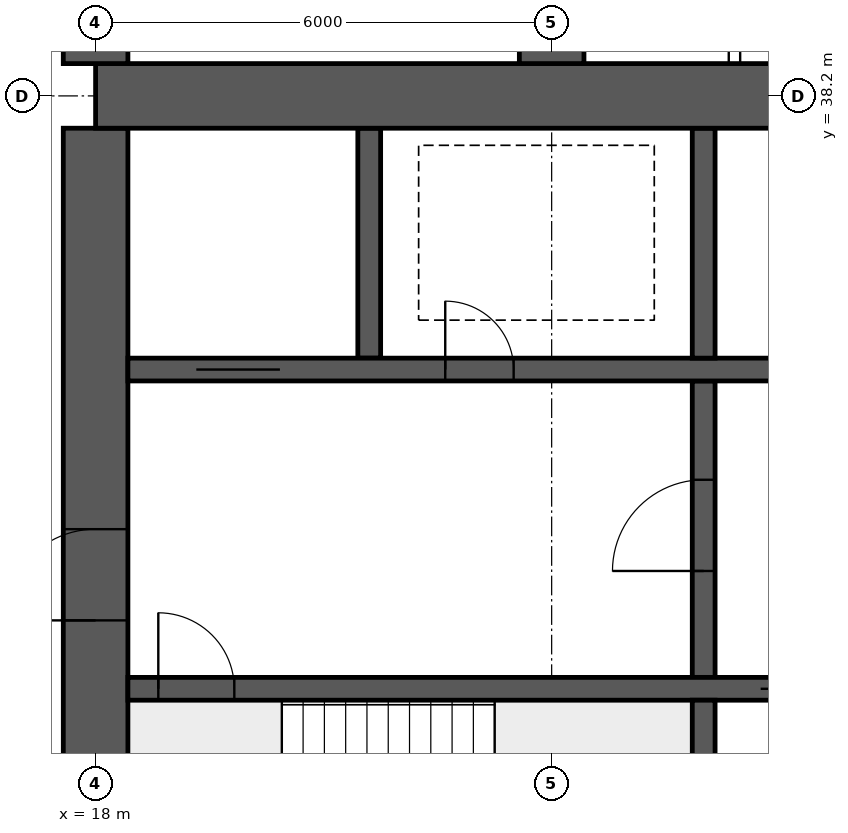
"""IFC4 building model, lengths in metres.
Left out: names, types, materials, properties, quantities, classifications, styles, units other than length and angle.
Written with IfcOpenShell. Run it as: python <this file> out.ifc"""

import sys

from ifc_helpers import new_model, si_unit, direction, frame, frame_2d, origin, place, context, subcontext, project, spatial, rectangle, extrude, element, fill, save


model = new_model("IFC4")
c1 = context("Model", 3, precision=1e-05, world=origin(), true_north=direction((0.0, 1.0)))
c2 = subcontext(c1, "Body", "Model", "MODEL_VIEW")
j1 = project(units=[si_unit("LENGTHUNIT", "METRE"), si_unit("PLANEANGLEUNIT", "RADIAN")], contexts=[c1])
p1 = place(None, origin())
s1 = spatial("IfcSite", under=j1, at=p1, CompositionType="ELEMENT")
p2 = place(p1, origin())
s2 = spatial("IfcBuilding", under=s1, at=p2, CompositionType="ELEMENT")
p3 = place(p2, frame((0.0, 0.0, 148.6)))
s3 = spatial("IfcBuildingStorey", under=s2, at=p3, CompositionType="ELEMENT", Elevation=148.6)
p4 = place(p3, frame((18.0, 38.2, 0.0), z_axis=(0.0, 0.0, 1.0), x_axis=(1.0, 0.0, 0.0)))
e1 = element("IfcWall", 1, at=p4, inside=s3, PredefinedType="SHEAR", context=c2, shape_type="SweptSolid", body=[
    extrude(rectangle(XDim=48.0, YDim=0.85, at=frame_2d((24.0, 0.0))), origin(), (0.0, 0.0, 1.0), 3.75),
])
p5 = place(p3, frame((18.0, 26.225, 0.0), z_axis=(0.0, 0.0, 1.0), x_axis=(0.0, 1.0, 0.0)))
e2 = element("IfcWall", 2, at=p5, inside=s3, PredefinedType="SHEAR", context=c2, shape_type="SweptSolid", body=[
    extrude(rectangle(XDim=11.55, YDim=0.85, at=frame_2d((5.775, 0.0))), origin(), (0.0, 0.0, 1.0), 3.75),
])
p6 = place(p5, frame((5.075, 0.0, 0.0)))
e3 = element("IfcOpeningElement", 3, at=p6, cuts=e2, PredefinedType="OPENING", context=c2, shape_type="SweptSolid", body=[
    extrude(rectangle(XDim=1.2, YDim=2.1, at=frame_2d((0.6, 1.05))), frame((0.0, 0.435, 0.0), z_axis=(0.0, -1.0, 0.0), x_axis=(1.0, 0.0, 0.0)), (0.0, 0.0, 1.0), 0.87),
])
p7 = place(p3, frame((18.425, 30.4, 0.0), z_axis=(0.0, 0.0, 1.0), x_axis=(1.0, 0.0, 0.0)))
e4 = element("IfcWall", 4, at=p7, inside=s3, PredefinedType="SHEAR", context=c2, shape_type="SweptSolid", body=[
    extrude(rectangle(XDim=47.15, YDim=0.3, at=frame_2d((23.575, 0.0))), origin(), (0.0, 0.0, 1.0), 3.75),
])
p8 = place(p7, frame((0.4, 0.0, 0.0)))
e5 = element("IfcOpeningElement", 5, at=p8, cuts=e4, PredefinedType="OPENING", context=c2, shape_type="SweptSolid", body=[
    extrude(rectangle(XDim=1.0, YDim=2.1, at=frame_2d((0.5, 1.05))), frame((0.0, 0.16, 0.0), z_axis=(0.0, -1.0, 0.0), x_axis=(1.0, 0.0, 0.0)), (0.0, 0.0, 1.0), 0.32),
])
p9 = place(p7, frame((45.75, 0.0, 0.0)))
e6 = element("IfcOpeningElement", 6, at=p9, cuts=e4, PredefinedType="OPENING", context=c2, shape_type="SweptSolid", body=[
    extrude(rectangle(XDim=1.0, YDim=2.1, at=frame_2d((0.5, 1.05))), frame((0.0, 0.16, 0.0), z_axis=(0.0, -1.0, 0.0), x_axis=(1.0, 0.0, 0.0)), (0.0, 0.0, 1.0), 0.32),
])
p10 = place(p7, frame((8.325, 0.0, 0.0)))
e7 = element("IfcOpeningElement", 7, at=p10, cuts=e4, PredefinedType="OPENING", context=c2, shape_type="SweptSolid", body=[
    extrude(rectangle(XDim=1.1, YDim=2.1, at=frame_2d((0.55, 1.05))), frame((0.0, 0.16, 0.0), z_axis=(0.0, -1.0, 0.0), x_axis=(1.0, 0.0, 0.0)), (0.0, 0.0, 1.0), 0.32),
])
p11 = place(p7, frame((10.925, 0.0, 0.0)))
e8 = element("IfcOpeningElement", 8, at=p11, cuts=e4, PredefinedType="OPENING", context=c2, shape_type="SweptSolid", body=[
    extrude(rectangle(XDim=1.1, YDim=2.1, at=frame_2d((0.55, 1.05))), frame((0.0, 0.16, 0.0), z_axis=(0.0, -1.0, 0.0), x_axis=(1.0, 0.0, 0.0)), (0.0, 0.0, 1.0), 0.32),
])
p12 = place(p7, frame((13.525, 0.0, 0.0)))
e9 = element("IfcOpeningElement", 9, at=p12, cuts=e4, PredefinedType="OPENING", context=c2, shape_type="SweptSolid", body=[
    extrude(rectangle(XDim=1.1, YDim=2.1, at=frame_2d((0.55, 1.05))), frame((0.0, 0.16, 0.0), z_axis=(0.0, -1.0, 0.0), x_axis=(1.0, 0.0, 0.0)), (0.0, 0.0, 1.0), 0.32),
])
p13 = place(p7, frame((16.125, 0.0, 0.0)))
e10 = element("IfcOpeningElement", 10, at=p13, cuts=e4, PredefinedType="OPENING", context=c2, shape_type="SweptSolid", body=[
    extrude(rectangle(XDim=1.1, YDim=2.1, at=frame_2d((0.55, 1.05))), frame((0.0, 0.16, 0.0), z_axis=(0.0, -1.0, 0.0), x_axis=(1.0, 0.0, 0.0)), (0.0, 0.0, 1.0), 0.32),
])
p14 = place(p7, frame((18.9, 0.0, 0.0)))
e11 = element("IfcOpeningElement", 11, at=p14, cuts=e4, PredefinedType="OPENING", context=c2, shape_type="SweptSolid", body=[
    extrude(rectangle(XDim=0.9, YDim=2.1, at=frame_2d((0.45, 1.05))), frame((0.0, 0.16, 0.0), z_axis=(0.0, -1.0, 0.0), x_axis=(1.0, 0.0, 0.0)), (0.0, 0.0, 1.0), 0.32),
])
p15 = place(p7, frame((30.192, 0.0, 0.0)))
e12 = element("IfcOpeningElement", 12, at=p15, cuts=e4, PredefinedType="OPENING", context=c2, shape_type="SweptSolid", body=[
    extrude(rectangle(XDim=1.1, YDim=2.1, at=frame_2d((0.55, 1.05))), frame((0.0, 0.16, 0.0), z_axis=(0.0, -1.0, 0.0), x_axis=(1.0, 0.0, 0.0)), (0.0, 0.0, 1.0), 0.32),
])
p16 = place(p7, frame((33.725, 0.0, 0.0)))
e13 = element("IfcOpeningElement", 13, at=p16, cuts=e4, PredefinedType="OPENING", context=c2, shape_type="SweptSolid", body=[
    extrude(rectangle(XDim=1.1, YDim=2.1, at=frame_2d((0.55, 1.05))), frame((0.0, 0.16, 0.0), z_axis=(0.0, -1.0, 0.0), x_axis=(1.0, 0.0, 0.0)), (0.0, 0.0, 1.0), 0.32),
])
p17 = place(p7, frame((37.258, 0.0, 0.0)))
e14 = element("IfcOpeningElement", 14, at=p17, cuts=e4, PredefinedType="OPENING", context=c2, shape_type="SweptSolid", body=[
    extrude(rectangle(XDim=1.1, YDim=2.1, at=frame_2d((0.55, 1.05))), frame((0.0, 0.16, 0.0), z_axis=(0.0, -1.0, 0.0), x_axis=(1.0, 0.0, 0.0)), (0.0, 0.0, 1.0), 0.32),
])
p18 = place(p3, frame((18.425, 34.6, 0.0), z_axis=(0.0, 0.0, 1.0), x_axis=(1.0, 0.0, 0.0)))
e15 = element("IfcWall", 15, at=p18, inside=s3, PredefinedType="SHEAR", context=c2, shape_type="SweptSolid", body=[
    extrude(rectangle(XDim=47.15, YDim=0.3, at=frame_2d((23.575, 0.0))), origin(), (0.0, 0.0, 1.0), 3.75),
])
p19 = place(p18, frame((0.9, 0.0, 0.0)))
e16 = element("IfcOpeningElement", 16, at=p19, cuts=e15, PredefinedType="OPENING", context=c2, shape_type="SweptSolid", body=[
    extrude(rectangle(XDim=1.1, YDim=2.1, at=frame_2d((0.55, 1.05))), frame((0.0, 0.16, 0.0), z_axis=(0.0, -1.0, 0.0), x_axis=(1.0, 0.0, 0.0)), (0.0, 0.0, 1.0), 0.32),
])
p20 = place(p18, frame((45.15, 0.0, 0.0)))
e17 = element("IfcOpeningElement", 17, at=p20, cuts=e15, PredefinedType="OPENING", context=c2, shape_type="SweptSolid", body=[
    extrude(rectangle(XDim=1.1, YDim=2.1, at=frame_2d((0.55, 1.05))), frame((0.0, 0.16, 0.0), z_axis=(0.0, -1.0, 0.0), x_axis=(1.0, 0.0, 0.0)), (0.0, 0.0, 1.0), 0.32),
])
p21 = place(p18, frame((4.175, 0.0, 0.0)))
e18 = element("IfcOpeningElement", 18, at=p21, cuts=e15, PredefinedType="OPENING", context=c2, shape_type="SweptSolid", body=[
    extrude(rectangle(XDim=0.9, YDim=2.1, at=frame_2d((0.45, 1.05))), frame((0.0, 0.16, 0.0), z_axis=(0.0, -1.0, 0.0), x_axis=(1.0, 0.0, 0.0)), (0.0, 0.0, 1.0), 0.32),
])
p22 = place(p18, frame((42.075, 0.0, 0.0)))
e19 = element("IfcOpeningElement", 19, at=p22, cuts=e15, PredefinedType="OPENING", context=c2, shape_type="SweptSolid", body=[
    extrude(rectangle(XDim=0.9, YDim=2.1, at=frame_2d((0.45, 1.05))), frame((0.0, 0.16, 0.0), z_axis=(0.0, -1.0, 0.0), x_axis=(1.0, 0.0, 0.0)), (0.0, 0.0, 1.0), 0.32),
])
p23 = place(p18, frame((8.95, 0.0, 0.0)))
e20 = element("IfcOpeningElement", 20, at=p23, cuts=e15, PredefinedType="OPENING", context=c2, shape_type="SweptSolid", body=[
    extrude(rectangle(XDim=0.9, YDim=2.1, at=frame_2d((0.45, 1.05))), frame((0.0, 0.16, 0.0), z_axis=(0.0, -1.0, 0.0), x_axis=(1.0, 0.0, 0.0)), (0.0, 0.0, 1.0), 0.32),
])
p24 = place(p18, frame((12.924, 0.0, 0.0)))
e21 = element("IfcOpeningElement", 21, at=p24, cuts=e15, PredefinedType="OPENING", context=c2, shape_type="SweptSolid", body=[
    extrude(rectangle(XDim=0.9, YDim=2.1, at=frame_2d((0.45, 1.05))), frame((0.0, 0.16, 0.0), z_axis=(0.0, -1.0, 0.0), x_axis=(1.0, 0.0, 0.0)), (0.0, 0.0, 1.0), 0.32),
])
p25 = place(p18, frame((16.571, 0.0, 0.0)))
e22 = element("IfcOpeningElement", 22, at=p25, cuts=e15, PredefinedType="OPENING", context=c2, shape_type="SweptSolid", body=[
    extrude(rectangle(XDim=0.9, YDim=2.1, at=frame_2d((0.45, 1.05))), frame((0.0, 0.16, 0.0), z_axis=(0.0, -1.0, 0.0), x_axis=(1.0, 0.0, 0.0)), (0.0, 0.0, 1.0), 0.32),
])
p26 = place(p18, frame((20.33, 0.0, 0.0)))
e23 = element("IfcOpeningElement", 23, at=p26, cuts=e15, PredefinedType="OPENING", context=c2, shape_type="SweptSolid", body=[
    extrude(rectangle(XDim=0.9, YDim=2.1, at=frame_2d((0.45, 1.05))), frame((0.0, 0.16, 0.0), z_axis=(0.0, -1.0, 0.0), x_axis=(1.0, 0.0, 0.0)), (0.0, 0.0, 1.0), 0.32),
])
p27 = place(p18, frame((24.736, 0.0, 0.0)))
e24 = element("IfcOpeningElement", 24, at=p27, cuts=e15, PredefinedType="OPENING", context=c2, shape_type="SweptSolid", body=[
    extrude(rectangle(XDim=0.9, YDim=2.1, at=frame_2d((0.45, 1.05))), frame((0.0, 0.16, 0.0), z_axis=(0.0, -1.0, 0.0), x_axis=(1.0, 0.0, 0.0)), (0.0, 0.0, 1.0), 0.32),
])
p28 = place(p18, frame((27.533, 0.0, 0.0)))
e25 = element("IfcOpeningElement", 25, at=p28, cuts=e15, PredefinedType="OPENING", context=c2, shape_type="SweptSolid", body=[
    extrude(rectangle(XDim=0.9, YDim=2.1, at=frame_2d((0.45, 1.05))), frame((0.0, 0.16, 0.0), z_axis=(0.0, -1.0, 0.0), x_axis=(1.0, 0.0, 0.0)), (0.0, 0.0, 1.0), 0.32),
])
p29 = place(p18, frame((29.703, 0.0, 0.0)))
e26 = element("IfcOpeningElement", 26, at=p29, cuts=e15, PredefinedType="OPENING", context=c2, shape_type="SweptSolid", body=[
    extrude(rectangle(XDim=0.9, YDim=2.1, at=frame_2d((0.45, 1.05))), frame((0.0, 0.16, 0.0), z_axis=(0.0, -1.0, 0.0), x_axis=(1.0, 0.0, 0.0)), (0.0, 0.0, 1.0), 0.32),
])
p30 = place(p18, frame((33.502, 0.0, 0.0)))
e27 = element("IfcOpeningElement", 27, at=p30, cuts=e15, PredefinedType="OPENING", context=c2, shape_type="SweptSolid", body=[
    extrude(rectangle(XDim=0.9, YDim=2.1, at=frame_2d((0.45, 1.05))), frame((0.0, 0.16, 0.0), z_axis=(0.0, -1.0, 0.0), x_axis=(1.0, 0.0, 0.0)), (0.0, 0.0, 1.0), 0.32),
])
p31 = place(p18, frame((37.453, 0.0, 0.0)))
e28 = element("IfcOpeningElement", 28, at=p31, cuts=e15, PredefinedType="OPENING", context=c2, shape_type="SweptSolid", body=[
    extrude(rectangle(XDim=0.9, YDim=2.1, at=frame_2d((0.45, 1.05))), frame((0.0, 0.16, 0.0), z_axis=(0.0, -1.0, 0.0), x_axis=(1.0, 0.0, 0.0)), (0.0, 0.0, 1.0), 0.32),
])
p32 = place(p3, frame((26.0, 26.225, 0.0), z_axis=(0.0, 0.0, 1.0), x_axis=(0.0, 1.0, 0.0)))
e29 = element("IfcWall", 29, at=p32, inside=s3, PredefinedType="SHEAR", context=c2, shape_type="SweptSolid", body=[
    extrude(rectangle(XDim=4.025, YDim=0.3, at=frame_2d((2.012, 0.0))), origin(), (0.0, 0.0, 1.0), 3.75),
])
p33 = place(p3, frame((26.0, 30.55, 0.0), z_axis=(0.0, 0.0, 1.0), x_axis=(0.0, 1.0, 0.0)))
e30 = element("IfcWall", 30, at=p33, inside=s3, PredefinedType="SHEAR", context=c2, shape_type="SweptSolid", body=[
    extrude(rectangle(XDim=3.9, YDim=0.3, at=frame_2d((1.95, 0.0))), origin(), (0.0, 0.0, 1.0), 3.75),
])
p34 = place(p33, frame((1.4, 0.0, 0.0)))
e31 = element("IfcOpeningElement", 31, at=p34, cuts=e30, PredefinedType="OPENING", context=c2, shape_type="SweptSolid", body=[
    extrude(rectangle(XDim=1.2, YDim=2.1, at=frame_2d((0.6, 1.05))), frame((0.0, 0.16, 0.0), z_axis=(0.0, -1.0, 0.0), x_axis=(1.0, 0.0, 0.0)), (0.0, 0.0, 1.0), 0.32),
])
for number, where, z_axis, x_axis in (
    (32, (21.6, 34.75, 0.0), (0.0, 0.0, 1.0), (0.0, 1.0, 0.0)),
    (33, (26.0, 34.75, 0.0), (0.0, 0.0, 1.0), (0.0, 1.0, 0.0)),
):
    element("IfcWall", number, at=place(p3, frame(where, z_axis=z_axis, x_axis=x_axis)), inside=s3, PredefinedType="SHEAR", context=c2, shape_type="SweptSolid", body=[
        extrude(rectangle(XDim=3.025, YDim=0.3, at=frame_2d((1.512, 0.0))), origin(), (0.0, 0.0, 1.0), 3.75),
    ])
for number, where, z_axis, x_axis in (
    (34, (18.0, 38.625, 0.0), (0.0, 0.0, 1.0), (0.0, 1.0, 0.0)),
    (35, (24.0, 38.625, 0.0), (0.0, 0.0, 1.0), (0.0, 1.0, 0.0)),
):
    element("IfcWall", number, at=place(p3, frame(where, z_axis=z_axis, x_axis=x_axis)), inside=s3, PredefinedType="SHEAR", context=c2, shape_type="SweptSolid", body=[
        extrude(rectangle(XDim=8.175, YDim=0.85, at=frame_2d((4.087, 0.0))), origin(), (0.0, 0.0, 1.0), 3.75),
    ])
p35 = place(p3, frame((26.405, 38.625, 0.0), z_axis=(0.0, 0.0, 1.0), x_axis=(0.0, 1.0, 0.0)))
e36 = element("IfcWall", 36, at=p35, inside=s3, PredefinedType="PARTITIONING", context=c2, shape_type="SweptSolid", body=[
    extrude(rectangle(XDim=8.075, YDim=0.15, at=frame_2d((4.038, 0.0))), origin(), (0.0, 0.0, 1.0), 3.5),
])
p36 = place(p6, origin())
e37 = element("IfcDoor", 37, at=p36, inside=s3, OperationType="SINGLE_SWING_LEFT", PredefinedType="DOOR", context=c2, shape_type="SweptSolid", body=[
    extrude(rectangle(XDim=1.2, YDim=2.1, at=frame_2d((0.6, 1.05))), frame((0.0, 0.025, 0.0), z_axis=(0.0, -1.0, 0.0), x_axis=(1.0, 0.0, 0.0)), (0.0, 0.0, 1.0), 0.05),
])
fill(e3, e37)
p37 = place(p8, origin())
e38 = element("IfcDoor", 38, at=p37, inside=s3, OperationType="SINGLE_SWING_LEFT", PredefinedType="DOOR", context=c2, shape_type="SweptSolid", body=[
    extrude(rectangle(XDim=1.0, YDim=2.1, at=frame_2d((0.5, 1.05))), frame((0.0, 0.025, 0.0), z_axis=(0.0, -1.0, 0.0), x_axis=(1.0, 0.0, 0.0)), (0.0, 0.0, 1.0), 0.05),
])
fill(e5, e38)
p38 = place(p19, origin())
e39 = element("IfcDoor", 39, at=p38, inside=s3, OperationType="DOUBLE_DOOR_SLIDING", PredefinedType="DOOR", context=c2, shape_type="SweptSolid", body=[
    extrude(rectangle(XDim=1.1, YDim=2.1, at=frame_2d((0.55, 1.05))), frame((0.0, 0.025, 0.0), z_axis=(0.0, -1.0, 0.0), x_axis=(1.0, 0.0, 0.0)), (0.0, 0.0, 1.0), 0.05),
])
fill(e16, e39)
p39 = place(p21, origin())
e40 = element("IfcDoor", 40, at=p39, inside=s3, OperationType="SINGLE_SWING_LEFT", PredefinedType="DOOR", context=c2, shape_type="SweptSolid", body=[
    extrude(rectangle(XDim=0.9, YDim=2.1, at=frame_2d((0.45, 1.05))), frame((0.0, 0.025, 0.0), z_axis=(0.0, -1.0, 0.0), x_axis=(1.0, 0.0, 0.0)), (0.0, 0.0, 1.0), 0.05),
])
fill(e18, e40)
p40 = place(p34, origin())
e41 = element("IfcDoor", 41, at=p40, inside=s3, OperationType="SINGLE_SWING_LEFT", PredefinedType="DOOR", context=c2, shape_type="SweptSolid", body=[
    extrude(rectangle(XDim=1.2, YDim=2.1, at=frame_2d((0.6, 1.05))), frame((0.0, 0.025, 0.0), z_axis=(0.0, -1.0, 0.0), x_axis=(1.0, 0.0, 0.0)), (0.0, 0.0, 1.0), 0.05),
])
fill(e31, e41)
p41 = place(p10, origin())
e42 = element("IfcDoor", 42, at=p41, inside=s3, OperationType="DOUBLE_DOOR_SLIDING", PredefinedType="DOOR", context=c2, shape_type="SweptSolid", body=[
    extrude(rectangle(XDim=1.1, YDim=2.1, at=frame_2d((0.55, 1.05))), frame((0.0, 0.025, 0.0), z_axis=(0.0, -1.0, 0.0), x_axis=(1.0, 0.0, 0.0)), (0.0, 0.0, 1.0), 0.05),
])
fill(e7, e42)
save(model, sys.argv[1])
